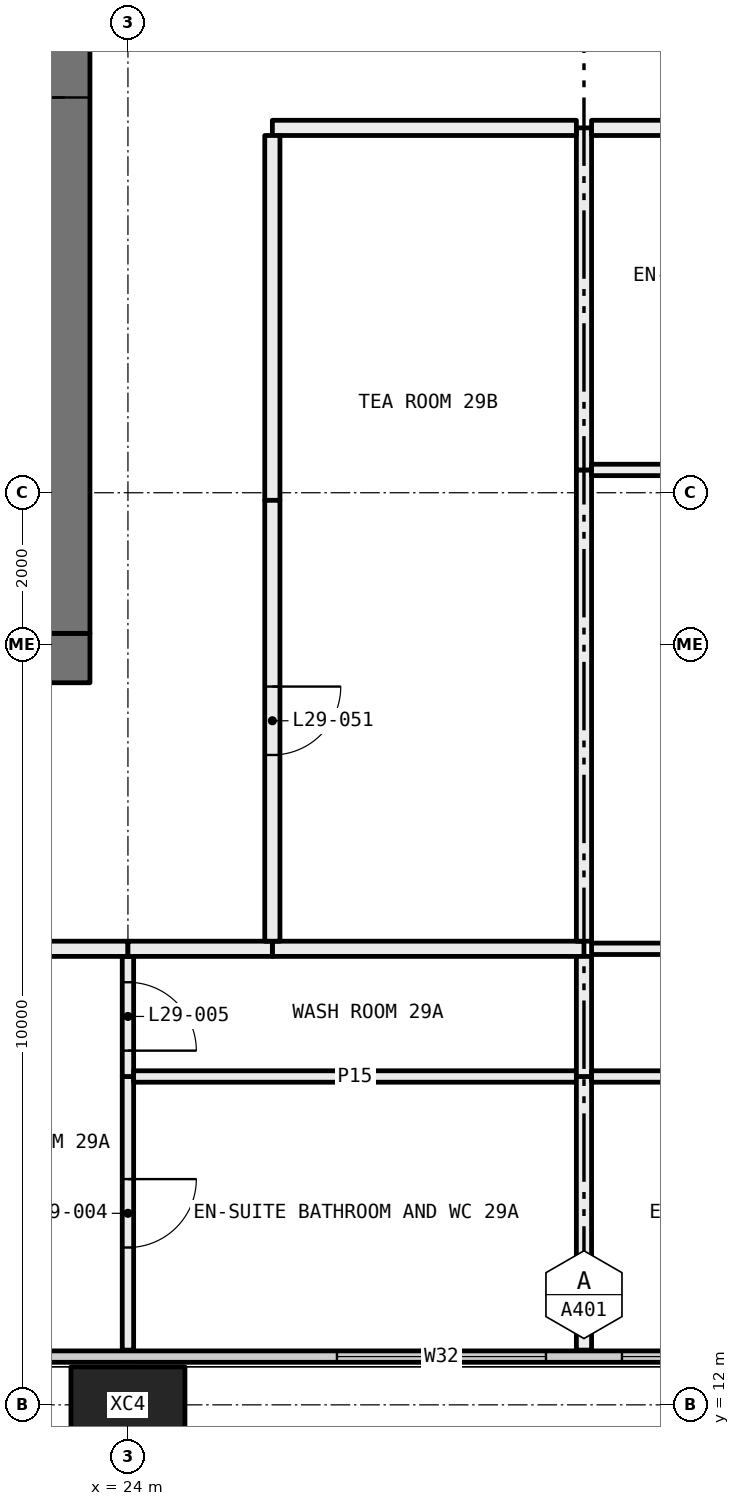
"""IFC4 building model, lengths in metres.
Left out: names, types, materials, properties, quantities, classifications, styles, units other than length and angle.
Written with IfcOpenShell. Run it as: python <this file> out.ifc"""

import sys

from ifc_helpers import new_model, si_unit, direction, frame, frame_2d, origin, origin_2d, place, context, subcontext, project, spatial, rectangle, hollow_rectangle, extrude, element, fill, save


model = new_model("IFC4")
c1 = context("Model", 3, precision=1e-05, world=origin(), true_north=direction((0.0, 1.0)))
c2 = subcontext(c1, "Body", "Model", "MODEL_VIEW")
j1 = project(units=[si_unit("LENGTHUNIT", "METRE"), si_unit("PLANEANGLEUNIT", "RADIAN")], contexts=[c1])
p1 = place(None, origin())
s1 = spatial("IfcSite", under=j1, at=p1, CompositionType="ELEMENT")
p2 = place(p1, origin())
s2 = spatial("IfcBuilding", under=s1, at=p2, CompositionType="ELEMENT")
p3 = place(p2, frame((0.0, 0.0, 113.85)))
s3 = spatial("IfcBuildingStorey", under=s2, at=p3, CompositionType="ELEMENT", Elevation=113.85)
p4 = place(p3, frame((24.0, 12.0, -0.4), z_axis=(0.0, 0.0, 1.0), x_axis=(1.0, 0.0, 0.0)))
e1 = element("IfcColumn", 1, at=p4, inside=s3, PredefinedType="COLUMN", context=c2, shape_type="SweptSolid", body=[
    extrude(hollow_rectangle(XDim=1.5, YDim=1.0, WallThickness=0.06, at=origin_2d()), origin(), (0.0, 0.0, 1.0), 3.45),
])
p5 = place(p3, frame((6.56, 12.635, 0.0), z_axis=(0.0, 0.0, 1.0), x_axis=(1.0, 0.0, 0.0)))
e2 = element("IfcWall", 2, at=p5, inside=s3, PredefinedType="ELEMENTEDWALL", context=c2, shape_type="SweptSolid", body=[
    extrude(rectangle(XDim=58.88, YDim=0.15, at=frame_2d((29.44, 0.0))), origin(), (0.0, 0.0, 1.0), 3.05),
])
p6 = place(p5, frame((0.44, 0.0, 0.45)))
e3 = element("IfcOpeningElement", 3, at=p6, cuts=e2, PredefinedType="OPENING", context=c2, shape_type="SweptSolid", body=[
    extrude(rectangle(XDim=4.5, YDim=2.55, at=frame_2d((2.25, 1.275))), frame((0.0, 0.085, 0.0), z_axis=(0.0, -1.0, 0.0), x_axis=(1.0, 0.0, 0.0)), (0.0, 0.0, 1.0), 0.17),
])
p7 = place(p5, frame((8.19, 0.0, 0.45)))
e4 = element("IfcOpeningElement", 4, at=p7, cuts=e2, PredefinedType="OPENING", context=c2, shape_type="SweptSolid", body=[
    extrude(rectangle(XDim=2.75, YDim=2.55, at=frame_2d((1.375, 1.275))), frame((0.0, 0.085, 0.0), z_axis=(0.0, -1.0, 0.0), x_axis=(1.0, 0.0, 0.0)), (0.0, 0.0, 1.0), 0.17),
])
p8 = place(p5, frame((11.94, 0.0, 0.45)))
e5 = element("IfcOpeningElement", 5, at=p8, cuts=e2, PredefinedType="OPENING", context=c2, shape_type="SweptSolid", body=[
    extrude(rectangle(XDim=2.75, YDim=2.55, at=frame_2d((1.375, 1.275))), frame((0.0, 0.085, 0.0), z_axis=(0.0, -1.0, 0.0), x_axis=(1.0, 0.0, 0.0)), (0.0, 0.0, 1.0), 0.17),
])
p9 = place(p5, frame((20.19, 0.0, 0.45)))
e6 = element("IfcOpeningElement", 6, at=p9, cuts=e2, PredefinedType="OPENING", context=c2, shape_type="SweptSolid", body=[
    extrude(rectangle(XDim=2.75, YDim=2.55, at=frame_2d((1.375, 1.275))), frame((0.0, 0.085, 0.0), z_axis=(0.0, -1.0, 0.0), x_axis=(1.0, 0.0, 0.0)), (0.0, 0.0, 1.0), 0.17),
])
p10 = place(p5, frame((23.94, 0.0, 0.45)))
e7 = element("IfcOpeningElement", 7, at=p10, cuts=e2, PredefinedType="OPENING", context=c2, shape_type="SweptSolid", body=[
    extrude(rectangle(XDim=2.0, YDim=2.55, at=frame_2d((1.0, 1.275))), frame((0.0, 0.085, 0.0), z_axis=(0.0, -1.0, 0.0), x_axis=(1.0, 0.0, 0.0)), (0.0, 0.0, 1.0), 0.17),
])
p11 = place(p5, frame((32.19, 0.0, 0.45)))
e8 = element("IfcOpeningElement", 8, at=p11, cuts=e2, PredefinedType="OPENING", context=c2, shape_type="SweptSolid", body=[
    extrude(rectangle(XDim=2.75, YDim=2.55, at=frame_2d((1.375, 1.275))), frame((0.0, 0.085, 0.0), z_axis=(0.0, -1.0, 0.0), x_axis=(1.0, 0.0, 0.0)), (0.0, 0.0, 1.0), 0.17),
])
p12 = place(p5, frame((35.94, 0.0, 0.45)))
e9 = element("IfcOpeningElement", 9, at=p12, cuts=e2, PredefinedType="OPENING", context=c2, shape_type="SweptSolid", body=[
    extrude(rectangle(XDim=2.75, YDim=2.55, at=frame_2d((1.375, 1.275))), frame((0.0, 0.085, 0.0), z_axis=(0.0, -1.0, 0.0), x_axis=(1.0, 0.0, 0.0)), (0.0, 0.0, 1.0), 0.17),
])
p13 = place(p5, frame((44.19, 0.0, 0.45)))
e10 = element("IfcOpeningElement", 10, at=p13, cuts=e2, PredefinedType="OPENING", context=c2, shape_type="SweptSolid", body=[
    extrude(rectangle(XDim=2.75, YDim=2.55, at=frame_2d((1.375, 1.275))), frame((0.0, 0.085, 0.0), z_axis=(0.0, -1.0, 0.0), x_axis=(1.0, 0.0, 0.0)), (0.0, 0.0, 1.0), 0.17),
])
p14 = place(p5, frame((47.94, 0.0, 0.45)))
e11 = element("IfcOpeningElement", 11, at=p14, cuts=e2, PredefinedType="OPENING", context=c2, shape_type="SweptSolid", body=[
    extrude(rectangle(XDim=2.0, YDim=2.55, at=frame_2d((1.0, 1.275))), frame((0.0, 0.085, 0.0), z_axis=(0.0, -1.0, 0.0), x_axis=(1.0, 0.0, 0.0)), (0.0, 0.0, 1.0), 0.17),
])
p15 = place(p5, frame((53.94, 0.0, 0.45)))
e12 = element("IfcOpeningElement", 12, at=p15, cuts=e2, PredefinedType="OPENING", context=c2, shape_type="SweptSolid", body=[
    extrude(rectangle(XDim=4.5, YDim=2.55, at=frame_2d((2.25, 1.275))), frame((0.0, 0.085, 0.0), z_axis=(0.0, -1.0, 0.0), x_axis=(1.0, 0.0, 0.0)), (0.0, 0.0, 1.0), 0.17),
])
p16 = place(p3, frame((24.0, 12.72, 0.0), z_axis=(0.0, 0.0, 1.0), x_axis=(0.0, 1.0, 0.0)))
e13 = element("IfcWall", 13, at=p16, inside=s3, PredefinedType="PARTITIONING", context=c2, shape_type="SweptSolid", body=[
    extrude(rectangle(XDim=3.6, YDim=0.15, at=frame_2d((1.8, 0.0))), origin(), (0.0, 0.0, 1.0), 3.05),
])
p17 = place(p16, frame((1.35, 0.0, 0.0)))
e14 = element("IfcOpeningElement", 14, at=p17, cuts=e13, PredefinedType="OPENING", context=c2, shape_type="SweptSolid", body=[
    extrude(rectangle(XDim=0.9, YDim=2.1, at=frame_2d((0.45, 1.05))), frame((0.0, 0.085, 0.0), z_axis=(0.0, -1.0, 0.0), x_axis=(1.0, 0.0, 0.0)), (0.0, 0.0, 1.0), 0.17),
])
p18 = place(p3, frame((24.0, 16.32, 0.0), z_axis=(0.0, 0.0, 1.0), x_axis=(0.0, 1.0, 0.0)))
e15 = element("IfcWall", 15, at=p18, inside=s3, PredefinedType="PARTITIONING", context=c2, shape_type="SweptSolid", body=[
    extrude(rectangle(XDim=1.58, YDim=0.15, at=frame_2d((0.79, 0.0))), origin(), (0.0, 0.0, 1.0), 3.05),
])
p19 = place(p18, frame((0.34, 0.0, 0.0)))
e16 = element("IfcOpeningElement", 16, at=p19, cuts=e15, PredefinedType="OPENING", context=c2, shape_type="SweptSolid", body=[
    extrude(rectangle(XDim=0.9, YDim=2.1, at=frame_2d((0.45, 1.05))), frame((0.0, 0.085, 0.0), z_axis=(0.0, -1.0, 0.0), x_axis=(1.0, 0.0, 0.0)), (0.0, 0.0, 1.0), 0.17),
])
p20 = place(p3, frame((24.0, 18.0, 0.0), z_axis=(0.0, 0.0, 1.0), x_axis=(-1.0, 0.0, 0.0)))
e17 = element("IfcWall", 17, at=p20, inside=s3, PredefinedType="PARTITIONING", context=c2, shape_type="SweptSolid", body=[
    extrude(rectangle(XDim=6.0, YDim=0.2, at=frame_2d((3.0, 0.0))), origin(), (0.0, 0.0, 1.0), 3.05),
])
p21 = place(p3, frame((29.9, 16.32, 0.0), z_axis=(0.0, 0.0, 1.0), x_axis=(-1.0, 0.0, 0.0)))
e18 = element("IfcWall", 18, at=p21, inside=s3, PredefinedType="PARTITIONING", context=c2, shape_type="SweptSolid", body=[
    extrude(rectangle(XDim=5.825, YDim=0.15, at=frame_2d((2.913, 0.0))), origin(), (0.0, 0.0, 1.0), 3.05),
])
p22 = place(p3, frame((30.0, 12.72, 0.0), z_axis=(0.0, 0.0, 1.0), x_axis=(0.0, 1.0, 0.0)))
e19 = element("IfcWall", 19, at=p22, inside=s3, PredefinedType="PARTITIONING", context=c2, shape_type="SweptSolid", body=[
    extrude(rectangle(XDim=3.6, YDim=0.2, at=frame_2d((1.8, 0.0))), origin(), (0.0, 0.0, 1.0), 3.05),
])
p23 = place(p3, frame((30.0, 18.0, 0.0), z_axis=(0.0, 0.0, 1.0), x_axis=(-1.0, 0.0, 0.0)))
e20 = element("IfcWall", 20, at=p23, inside=s3, PredefinedType="PARTITIONING", context=c2, shape_type="SweptSolid", body=[
    extrude(rectangle(XDim=4.1, YDim=0.2, at=frame_2d((2.05, 0.0))), origin(), (0.0, 0.0, 1.0), 3.05),
])
p24 = place(p3, frame((30.0, 16.32, 0.0), z_axis=(0.0, 0.0, 1.0), x_axis=(0.0, 1.0, 0.0)))
e21 = element("IfcWall", 21, at=p24, inside=s3, PredefinedType="PARTITIONING", context=c2, shape_type="SweptSolid", body=[
    extrude(rectangle(XDim=1.58, YDim=0.2, at=frame_2d((0.79, 0.0))), origin(), (0.0, 0.0, 1.0), 3.05),
])
p25 = place(p3, frame((25.9, 18.0, 0.0), z_axis=(0.0, 0.0, 1.0), x_axis=(-1.0, 0.0, 0.0)))
e22 = element("IfcWall", 22, at=p25, inside=s3, PredefinedType="PARTITIONING", context=c2, shape_type="SweptSolid", body=[
    extrude(rectangle(XDim=1.9, YDim=0.2, at=frame_2d((0.95, 0.0))), origin(), (0.0, 0.0, 1.0), 3.05),
])
p26 = place(p3, frame((30.0, 18.1, 0.0), z_axis=(0.0, 0.0, 1.0), x_axis=(0.0, 1.0, 0.0)))
e23 = element("IfcWall", 23, at=p26, inside=s3, PredefinedType="PARTITIONING", context=c2, shape_type="SweptSolid", body=[
    extrude(rectangle(XDim=6.2, YDim=0.2, at=frame_2d((3.1, 0.0))), origin(), (0.0, 0.0, 1.0), 2.45),
])
p27 = place(p3, frame((30.0, 24.3, 0.0), z_axis=(0.0, 0.0, 1.0), x_axis=(0.0, 1.0, 0.0)))
e24 = element("IfcWall", 24, at=p27, inside=s3, PredefinedType="PARTITIONING", context=c2, shape_type="SweptSolid", body=[
    extrude(rectangle(XDim=4.5, YDim=0.2, at=frame_2d((2.25, 0.0))), origin(), (0.0, 0.0, 1.0), 3.05),
])
p28 = place(p3, frame((29.9, 28.8, 0.0), z_axis=(0.0, 0.0, 1.0), x_axis=(-1.0, 0.0, 0.0)))
e25 = element("IfcWall", 25, at=p28, inside=s3, PredefinedType="PARTITIONING", context=c2, shape_type="SweptSolid", body=[
    extrude(rectangle(XDim=4.0, YDim=0.2, at=frame_2d((2.0, 0.0))), origin(), (0.0, 0.0, 1.0), 3.05),
])
p29 = place(p3, frame((25.9, 28.7, 0.0), z_axis=(0.0, 0.0, 1.0), x_axis=(0.0, -1.0, 0.0)))
e26 = element("IfcWall", 26, at=p29, inside=s3, PredefinedType="PARTITIONING", context=c2, shape_type="SweptSolid", body=[
    extrude(rectangle(XDim=4.8, YDim=0.2, at=frame_2d((2.4, 0.0))), origin(), (0.0, 0.0, 1.0), 2.45),
])
p30 = place(p3, frame((25.9, 23.9, 0.0), z_axis=(0.0, 0.0, 1.0), x_axis=(0.0, -1.0, 0.0)))
e27 = element("IfcWall", 27, at=p30, inside=s3, PredefinedType="PARTITIONING", context=c2, shape_type="SweptSolid", body=[
    extrude(rectangle(XDim=5.8, YDim=0.2, at=frame_2d((2.9, 0.0))), origin(), (0.0, 0.0, 1.0), 3.05),
])
p31 = place(p30, frame((2.45, 0.0, 0.0)))
e28 = element("IfcOpeningElement", 28, at=p31, cuts=e27, PredefinedType="OPENING", context=c2, shape_type="SweptSolid", body=[
    extrude(rectangle(XDim=0.9, YDim=2.1, at=frame_2d((0.45, 1.05))), frame((0.0, 0.11, 0.0), z_axis=(0.0, -1.0, 0.0), x_axis=(1.0, 0.0, 0.0)), (0.0, 0.0, 1.0), 0.22),
])
p32 = place(p3, frame((36.0, 16.32, 0.0), z_axis=(0.0, 0.0, 1.0), x_axis=(-1.0, 0.0, 0.0)))
e29 = element("IfcWall", 29, at=p32, inside=s3, PredefinedType="PARTITIONING", context=c2, shape_type="SweptSolid", body=[
    extrude(rectangle(XDim=5.9, YDim=0.15, at=frame_2d((2.95, 0.0))), origin(), (0.0, 0.0, 1.0), 2.45),
])
p33 = place(p3, frame((35.925, 18.0, 0.0), z_axis=(0.0, 0.0, 1.0), x_axis=(-1.0, 0.0, 0.0)))
e30 = element("IfcWall", 30, at=p33, inside=s3, PredefinedType="PARTITIONING", context=c2, shape_type="SweptSolid", body=[
    extrude(rectangle(XDim=5.825, YDim=0.15, at=frame_2d((2.913, 0.0))), origin(), (0.0, 0.0, 1.0), 2.45),
])
p34 = place(p3, frame((34.5, 24.3, 0.0), z_axis=(0.0, 0.0, 1.0), x_axis=(-1.0, 0.0, 0.0)))
e31 = element("IfcWall", 31, at=p34, inside=s3, PredefinedType="PARTITIONING", context=c2, shape_type="SweptSolid", body=[
    extrude(rectangle(XDim=4.4, YDim=0.15, at=frame_2d((2.2, 0.0))), origin(), (0.0, 0.0, 1.0), 3.05),
])
p35 = place(p34, frame((1.75, 0.0, 0.0)))
e32 = element("IfcOpeningElement", 32, at=p35, cuts=e31, PredefinedType="OPENING", context=c2, shape_type="SweptSolid", body=[
    extrude(rectangle(XDim=0.9, YDim=2.1, at=frame_2d((0.45, 1.05))), frame((0.0, 0.085, 0.0), z_axis=(0.0, -1.0, 0.0), x_axis=(1.0, 0.0, 0.0)), (0.0, 0.0, 1.0), 0.17),
])
p36 = place(p3, frame((34.5, 28.8, 0.0), z_axis=(0.0, 0.0, 1.0), x_axis=(-1.0, 0.0, 0.0)))
e33 = element("IfcWall", 33, at=p36, inside=s3, PredefinedType="PARTITIONING", context=c2, shape_type="SweptSolid", body=[
    extrude(rectangle(XDim=4.4, YDim=0.2, at=frame_2d((2.2, 0.0))), origin(), (0.0, 0.0, 1.0), 3.05),
])
p37 = place(p3, frame((12.5, 21.825, 0.0), z_axis=(0.0, 0.0, 1.0), x_axis=(1.0, 0.0, 0.0)))
e34 = element("IfcWall", 34, at=p37, inside=s3, PredefinedType="SHEAR", context=c2, shape_type="SweptSolid", body=[
    extrude(rectangle(XDim=11.0, YDim=0.65, at=frame_2d((5.5, 0.0))), origin(), (0.0, 0.0, 1.0), 3.05),
])
p38 = place(p3, frame((23.175, 22.15, 0.0), z_axis=(0.0, 0.0, 1.0), x_axis=(0.0, 1.0, 0.0)))
e35 = element("IfcWall", 35, at=p38, inside=s3, PredefinedType="SHEAR", context=c2, shape_type="SweptSolid", body=[
    extrude(rectangle(XDim=15.7, YDim=0.65, at=frame_2d((7.85, 0.0))), origin(), (0.0, 0.0, 1.0), 3.05),
])
p39 = place(p38, frame((7.05, 0.0, 0.0)))
e36 = element("IfcOpeningElement", 36, at=p39, cuts=e35, PredefinedType="OPENING", context=c2, shape_type="SweptSolid", body=[
    extrude(rectangle(XDim=1.6, YDim=2.1, at=frame_2d((0.8, 1.05))), frame((0.0, 0.335, 0.0), z_axis=(0.0, -1.0, 0.0), x_axis=(1.0, 0.0, 0.0)), (0.0, 0.0, 1.0), 0.67),
])
p40 = place(p9, origin())
e37 = element("IfcWindow", 37, at=p40, inside=s3, PartitioningType="SINGLE_PANEL", PredefinedType="WINDOW", context=c2, shape_type="SweptSolid", body=[
    extrude(rectangle(XDim=2.75, YDim=2.55, at=frame_2d((1.375, 1.275))), frame((0.0, 0.03, 0.0), z_axis=(0.0, -1.0, 0.0), x_axis=(1.0, 0.0, 0.0)), (0.0, 0.0, 1.0), 0.06),
])
fill(e6, e37)
p41 = place(p10, origin())
e38 = element("IfcWindow", 38, at=p41, inside=s3, PartitioningType="SINGLE_PANEL", PredefinedType="WINDOW", context=c2, shape_type="SweptSolid", body=[
    extrude(rectangle(XDim=2.0, YDim=2.55, at=frame_2d((1.0, 1.275))), frame((0.0, 0.03, 0.0), z_axis=(0.0, -1.0, 0.0), x_axis=(1.0, 0.0, 0.0)), (0.0, 0.0, 1.0), 0.06),
])
fill(e7, e38)
p42 = place(p17, frame((0.9, 0.0, 0.0), x_axis=(-1.0, 0.0, 0.0)))
e39 = element("IfcDoor", 39, at=p42, inside=s3, OperationType="SINGLE_SWING_RIGHT", PredefinedType="DOOR", context=c2, shape_type="SweptSolid", body=[
    extrude(rectangle(XDim=0.9, YDim=2.1, at=frame_2d((0.45, 1.05))), frame((0.0, 0.025, 0.0), z_axis=(0.0, -1.0, 0.0), x_axis=(1.0, 0.0, 0.0)), (0.0, 0.0, 1.0), 0.05),
])
fill(e14, e39)
p43 = place(p19, frame((0.9, 0.0, 0.0), x_axis=(-1.0, 0.0, 0.0)))
e40 = element("IfcDoor", 40, at=p43, inside=s3, OperationType="SINGLE_SWING_LEFT", PredefinedType="DOOR", context=c2, shape_type="SweptSolid", body=[
    extrude(rectangle(XDim=0.9, YDim=2.1, at=frame_2d((0.45, 1.05))), frame((0.0, 0.025, 0.0), z_axis=(0.0, -1.0, 0.0), x_axis=(1.0, 0.0, 0.0)), (0.0, 0.0, 1.0), 0.05),
])
fill(e16, e40)
p44 = place(p31, origin())
e41 = element("IfcDoor", 41, at=p44, inside=s3, OperationType="SINGLE_SWING_RIGHT", PredefinedType="DOOR", context=c2, shape_type="SweptSolid", body=[
    extrude(rectangle(XDim=0.9, YDim=2.1, at=frame_2d((0.45, 1.05))), frame((0.0, 0.025, 0.0), z_axis=(0.0, -1.0, 0.0), x_axis=(1.0, 0.0, 0.0)), (0.0, 0.0, 1.0), 0.05),
])
fill(e28, e41)
p45 = place(p39, origin())
e42 = element("IfcDoor", 42, at=p45, inside=s3, OperationType="DOUBLE_DOOR_SINGLE_SWING", PredefinedType="DOOR", context=c2, shape_type="SweptSolid", body=[
    extrude(rectangle(XDim=1.6, YDim=2.1, at=frame_2d((0.8, 1.05))), frame((0.0, 0.025, 0.0), z_axis=(0.0, -1.0, 0.0), x_axis=(1.0, 0.0, 0.0)), (0.0, 0.0, 1.0), 0.05),
])
fill(e36, e42)
save(model, sys.argv[1])
